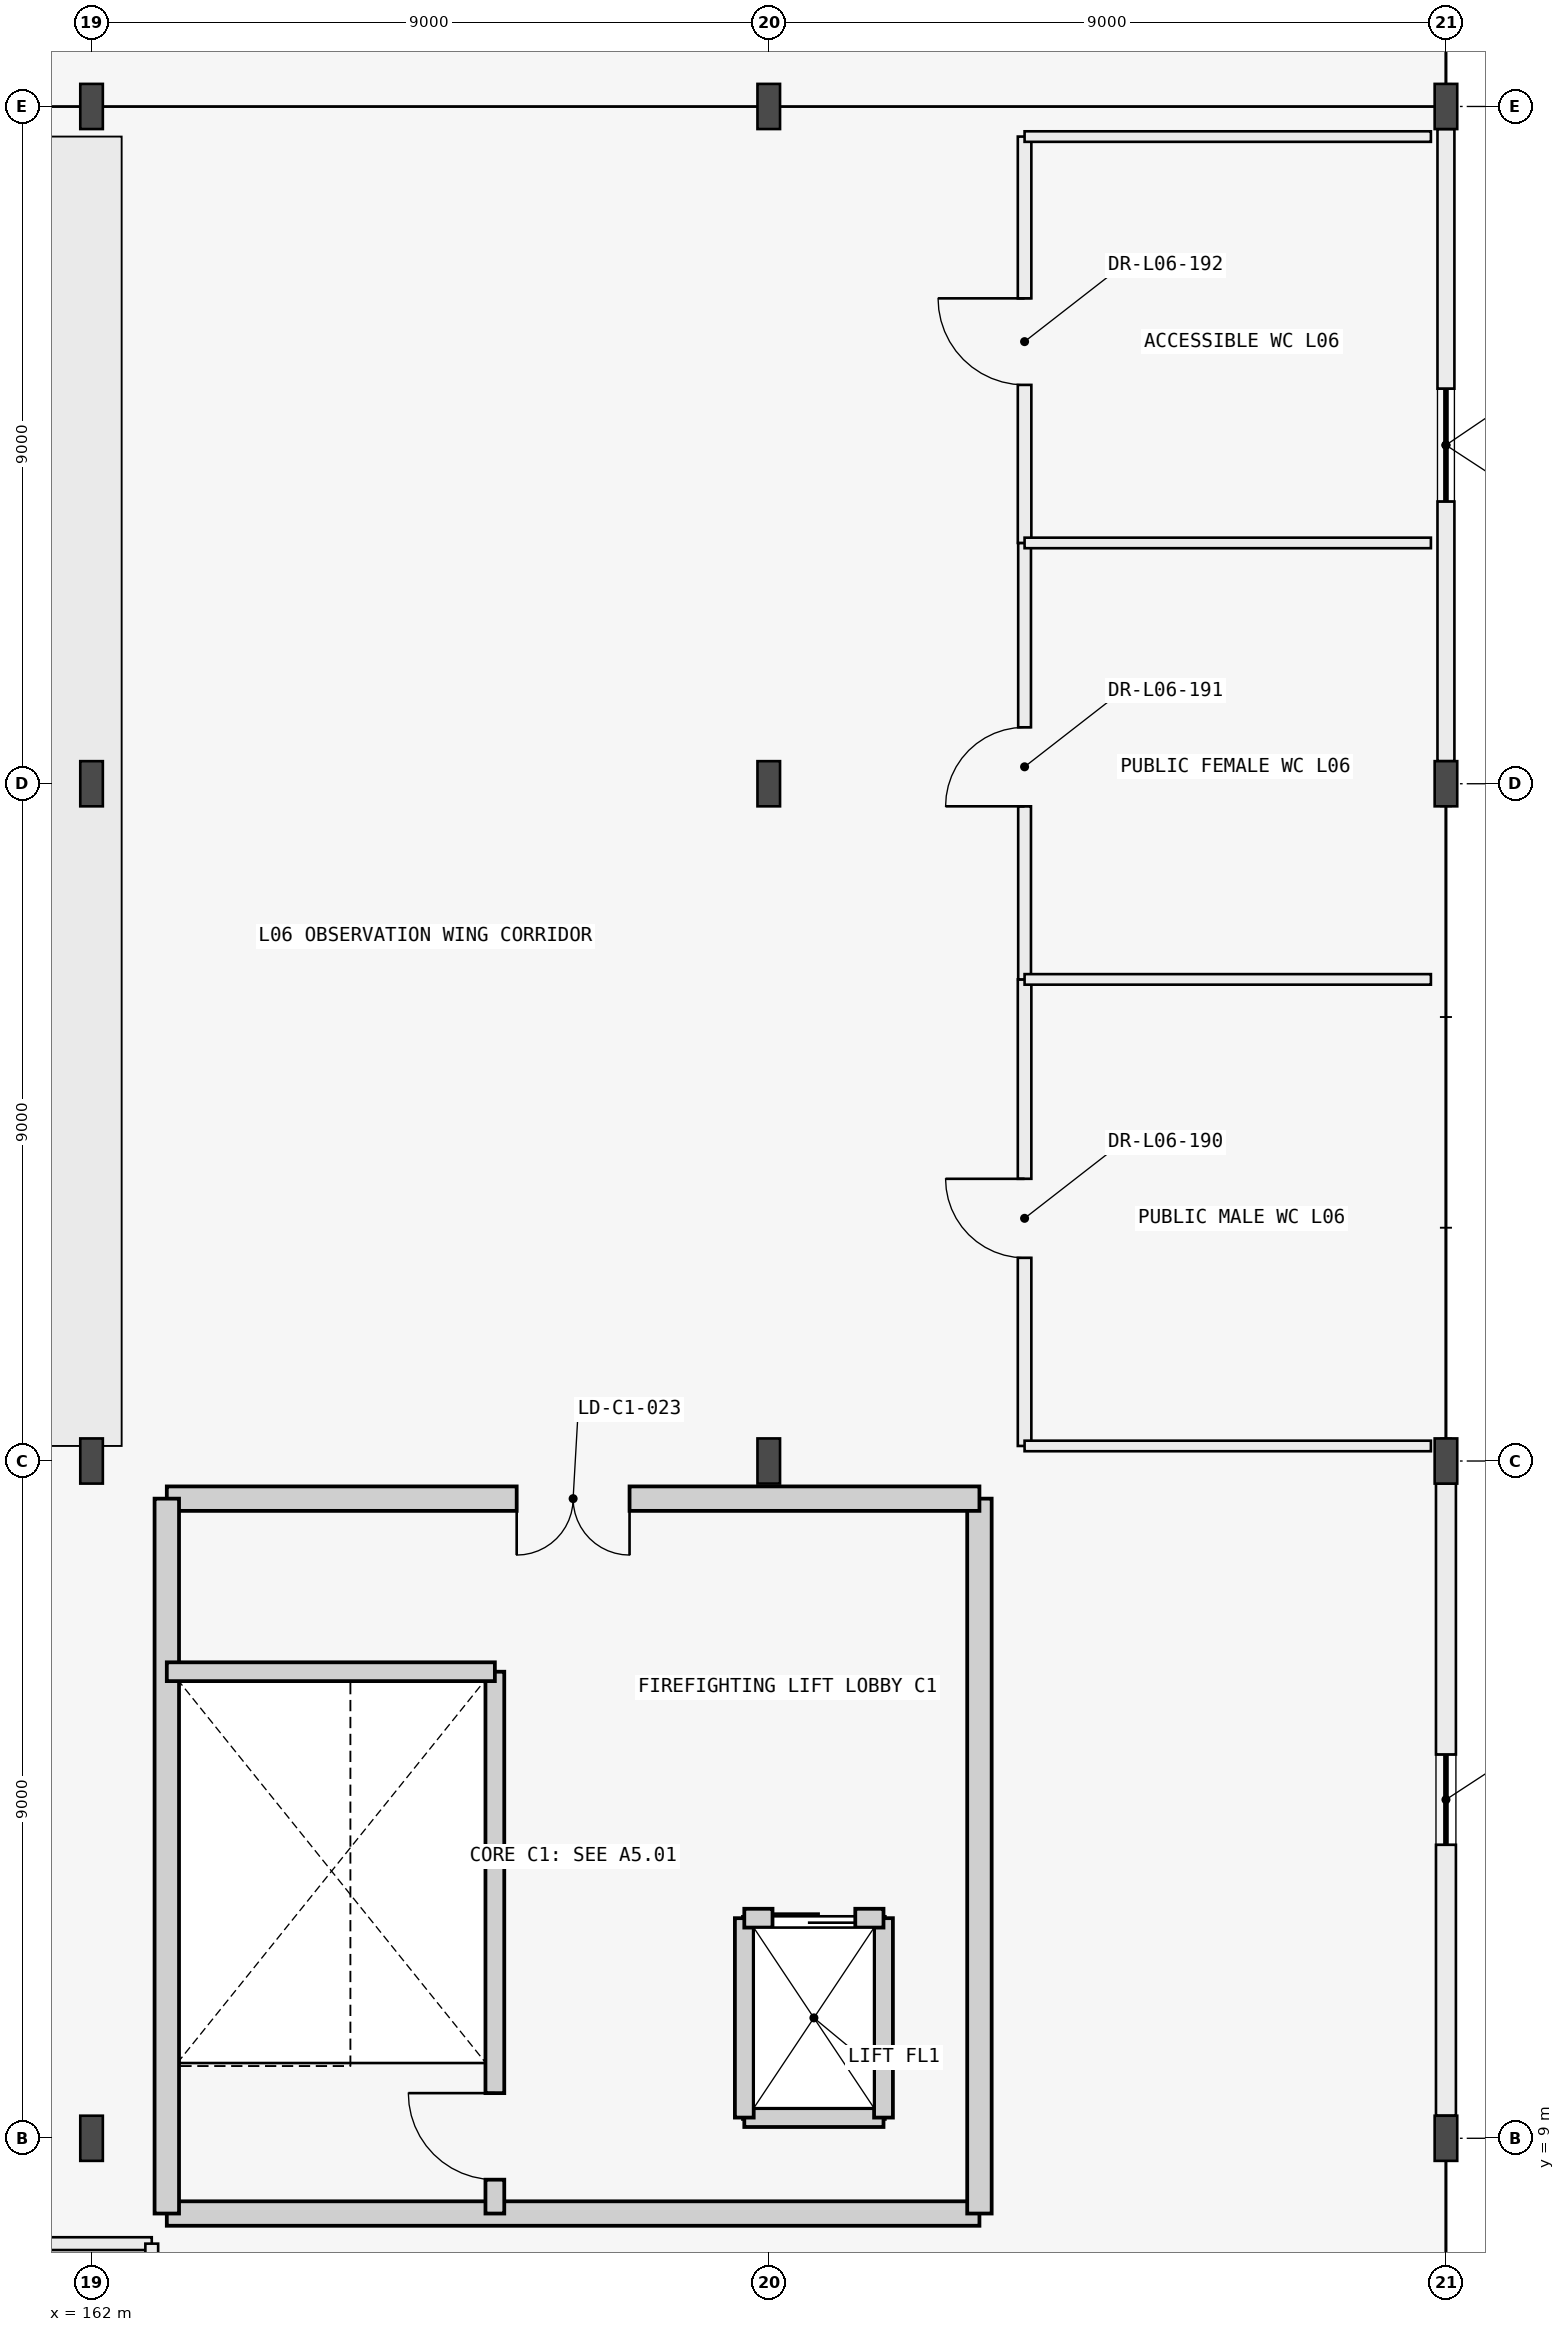
"""IFC4 building model, lengths in metres.
Left out: names, types, materials, properties, quantities, classifications, styles, units other than length and angle.
Written with IfcOpenShell. Run it as: python <this file> out.ifc"""

import sys

from ifc_helpers import new_model, si_unit, direction, frame, frame_2d, origin, origin_2d, place, context, subcontext, project, spatial, rectangle, i_section, extrude, element, fill, save


model = new_model("IFC4")
c1 = context("Model", 3, precision=1e-05, world=origin(), true_north=direction((0.0, 1.0)))
c2 = subcontext(c1, "Body", "Model", "MODEL_VIEW")
j1 = project(units=[si_unit("LENGTHUNIT", "METRE"), si_unit("PLANEANGLEUNIT", "RADIAN")], contexts=[c1])
p1 = place(None, origin())
s1 = spatial("IfcSite", under=j1, at=p1, CompositionType="ELEMENT")
p2 = place(p1, origin())
s2 = spatial("IfcBuilding", under=s1, at=p2, CompositionType="ELEMENT")
p3 = place(p2, frame((0.0, 0.0, 25.2)))
s3 = spatial("IfcBuildingStorey", under=s2, at=p3, CompositionType="ELEMENT", Elevation=25.2)
for number, where, z_axis, x_axis in (
    (1, (162.0, 9.0, 0.0), (0.0, 0.0, 1.0), (1.0, 0.0, 0.0)),
    (2, (180.0, 9.0, 0.0), (0.0, 0.0, 1.0), (1.0, 0.0, 0.0)),
    (3, (162.0, 18.0, 0.0), (0.0, 0.0, 1.0), (1.0, 0.0, 0.0)),
    (4, (171.0, 18.0, 0.0), (0.0, 0.0, 1.0), (1.0, 0.0, 0.0)),
    (5, (180.0, 18.0, 0.0), (0.0, 0.0, 1.0), (1.0, 0.0, 0.0)),
    (6, (162.0, 27.0, 0.0), (0.0, 0.0, 1.0), (1.0, 0.0, 0.0)),
    (7, (171.0, 27.0, 0.0), (0.0, 0.0, 1.0), (1.0, 0.0, 0.0)),
    (8, (180.0, 27.0, 0.0), (0.0, 0.0, 1.0), (1.0, 0.0, 0.0)),
    (9, (162.0, 36.0, 0.0), (0.0, 0.0, 1.0), (1.0, 0.0, 0.0)),
    (10, (171.0, 36.0, 0.0), (0.0, 0.0, 1.0), (1.0, 0.0, 0.0)),
    (11, (180.0, 36.0, 0.0), (0.0, 0.0, 1.0), (1.0, 0.0, 0.0)),
):
    element("IfcColumn", number, at=place(p3, frame(where, z_axis=z_axis, x_axis=x_axis)), inside=s3, PredefinedType="COLUMN", context=c2, shape_type="SweptSolid", body=[
        extrude(i_section(OverallWidth=0.3, OverallDepth=0.6, WebThickness=0.015, FlangeThickness=0.03, FilletRadius=0.027, at=origin_2d()), origin(), (0.0, 0.0, 1.0), 4.2),
    ])
p4 = place(p3, frame((180.0, 9.3, 0.0), z_axis=(0.0, 0.0, 1.0), x_axis=(0.0, 1.0, 0.0)))
e12 = element("IfcWall", 12, at=p4, inside=s3, PredefinedType="STANDARD", context=c2, shape_type="SweptSolid", body=[
    extrude(rectangle(XDim=8.4, YDim=0.265, at=frame_2d((4.2, 0.0))), origin(), (0.0, 0.0, 1.0), 3.635),
])
p5 = place(p4, frame((3.6, 0.0, 0.95)))
e13 = element("IfcOpeningElement", 13, at=p5, cuts=e12, PredefinedType="OPENING", context=c2, shape_type="SweptSolid", body=[
    extrude(rectangle(XDim=1.2, YDim=1.35, at=frame_2d((0.6, 0.675))), frame((0.0, 0.143, 0.0), z_axis=(0.0, -1.0, 0.0), x_axis=(1.0, 0.0, 0.0)), (0.0, 0.0, 1.0), 0.285),
])
p6 = place(p3, frame((180.0, 27.3, 0.0), z_axis=(0.0, 0.0, 1.0), x_axis=(0.0, 1.0, 0.0)))
e14 = element("IfcWall", 14, at=p6, inside=s3, PredefinedType="STANDARD", context=c2, shape_type="SweptSolid", body=[
    extrude(rectangle(XDim=8.4, YDim=0.225, at=frame_2d((4.2, 0.0))), origin(), (0.0, 0.0, 1.0), 3.635),
])
p7 = place(p6, frame((3.45, 0.0, 0.95)))
e15 = element("IfcOpeningElement", 15, at=p7, cuts=e14, PredefinedType="OPENING", context=c2, shape_type="SweptSolid", body=[
    extrude(rectangle(XDim=1.5, YDim=1.5, at=frame_2d((0.75, 0.75))), frame((0.0, 0.123, 0.0), z_axis=(0.0, -1.0, 0.0), x_axis=(1.0, 0.0, 0.0)), (0.0, 0.0, 1.0), 0.245),
])
p8 = place(p3, frame((163.0, 8.0, 0.0), z_axis=(0.0, 0.0, 1.0), x_axis=(1.0, 0.0, 0.0)))
e16 = element("IfcWall", 16, at=p8, inside=s3, PredefinedType="SHEAR", context=c2, shape_type="SweptSolid", body=[
    extrude(rectangle(XDim=10.8, YDim=0.325, at=frame_2d((5.4, 0.0))), origin(), (0.0, 0.0, 1.0), 3.96),
])
p9 = place(p3, frame((173.8, 8.0, 0.0), z_axis=(0.0, 0.0, 1.0), x_axis=(0.0, 1.0, 0.0)))
e17 = element("IfcWall", 17, at=p9, inside=s3, PredefinedType="SHEAR", context=c2, shape_type="SweptSolid", body=[
    extrude(rectangle(XDim=9.5, YDim=0.325, at=frame_2d((4.75, 0.0))), origin(), (0.0, 0.0, 1.0), 3.96),
])
p10 = place(p3, frame((173.8, 17.5, 0.0), z_axis=(0.0, 0.0, 1.0), x_axis=(-1.0, 0.0, 0.0)))
e18 = element("IfcWall", 18, at=p10, inside=s3, PredefinedType="SHEAR", context=c2, shape_type="SweptSolid", body=[
    extrude(rectangle(XDim=10.8, YDim=0.325, at=frame_2d((5.4, 0.0))), origin(), (0.0, 0.0, 1.0), 3.96),
])
p11 = place(p10, frame((4.65, 0.0, 0.0)))
e19 = element("IfcOpeningElement", 19, at=p11, cuts=e18, PredefinedType="OPENING", context=c2, shape_type="SweptSolid", body=[
    extrude(rectangle(XDim=1.5, YDim=2.2, at=frame_2d((0.75, 1.1))), frame((0.0, 0.172, 0.0), z_axis=(0.0, -1.0, 0.0), x_axis=(1.0, 0.0, 0.0)), (0.0, 0.0, 1.0), 0.345),
])
p12 = place(p3, frame((163.0, 17.5, 0.0), z_axis=(0.0, 0.0, 1.0), x_axis=(0.0, -1.0, 0.0)))
e20 = element("IfcWall", 20, at=p12, inside=s3, PredefinedType="SHEAR", context=c2, shape_type="SweptSolid", body=[
    extrude(rectangle(XDim=9.5, YDim=0.325, at=frame_2d((4.75, 0.0))), origin(), (0.0, 0.0, 1.0), 3.96),
])
p13 = place(p3, frame((167.36, 8.0, 0.0), z_axis=(0.0, 0.0, 1.0), x_axis=(0.0, 1.0, 0.0)))
e21 = element("IfcWall", 21, at=p13, inside=s3, PredefinedType="SHEAR", context=c2, shape_type="SweptSolid", body=[
    extrude(rectangle(XDim=7.2, YDim=0.25, at=frame_2d((3.6, 0.0))), origin(), (0.0, 0.0, 1.0), 3.96),
])
p14 = place(p13, frame((0.45, 0.0, 0.0)))
e22 = element("IfcOpeningElement", 22, at=p14, cuts=e21, PredefinedType="OPENING", context=c2, shape_type="SweptSolid", body=[
    extrude(rectangle(XDim=1.15, YDim=2.15, at=frame_2d((0.575, 1.075))), frame((0.0, 0.135, 0.0), z_axis=(0.0, -1.0, 0.0), x_axis=(1.0, 0.0, 0.0)), (0.0, 0.0, 1.0), 0.27),
])
p15 = place(p3, frame((163.0, 15.2, 0.0), z_axis=(0.0, 0.0, 1.0), x_axis=(1.0, 0.0, 0.0)))
e23 = element("IfcWall", 23, at=p15, inside=s3, PredefinedType="SHEAR", context=c2, shape_type="SweptSolid", body=[
    extrude(rectangle(XDim=4.36, YDim=0.25, at=frame_2d((2.18, 0.0))), origin(), (0.0, 0.0, 1.0), 3.96),
])
p16 = place(p3, frame((170.675, 9.275, 0.0), z_axis=(0.0, 0.0, 1.0), x_axis=(1.0, 0.0, 0.0)))
e24 = element("IfcWall", 24, at=p16, inside=s3, PredefinedType="SHEAR", context=c2, shape_type="SweptSolid", body=[
    extrude(rectangle(XDim=1.85, YDim=0.25, at=frame_2d((0.925, 0.0))), origin(), (0.0, 0.0, 1.0), 3.96),
])
for number, where, z_axis, x_axis in (
    (25, (170.675, 9.275, 0.0), (0.0, 0.0, 1.0), (0.0, 1.0, 0.0)),
    (26, (172.525, 9.275, 0.0), (0.0, 0.0, 1.0), (0.0, 1.0, 0.0)),
):
    element("IfcWall", number, at=place(p3, frame(where, z_axis=z_axis, x_axis=x_axis)), inside=s3, PredefinedType="SHEAR", context=c2, shape_type="SweptSolid", body=[
        extrude(rectangle(XDim=2.65, YDim=0.25, at=frame_2d((1.325, 0.0))), origin(), (0.0, 0.0, 1.0), 3.96),
    ])
p17 = place(p3, frame((170.675, 11.925, 0.0), z_axis=(0.0, 0.0, 1.0), x_axis=(1.0, 0.0, 0.0)))
e27 = element("IfcWall", 27, at=p17, inside=s3, PredefinedType="SHEAR", context=c2, shape_type="SweptSolid", body=[
    extrude(rectangle(XDim=1.85, YDim=0.25, at=frame_2d((0.925, 0.0))), origin(), (0.0, 0.0, 1.0), 3.96),
])
p18 = place(p17, frame((0.375, 0.0, 0.0)))
e28 = element("IfcOpeningElement", 28, at=p18, cuts=e27, PredefinedType="OPENING", context=c2, shape_type="SweptSolid", body=[
    extrude(rectangle(XDim=1.1, YDim=2.15, at=frame_2d((0.55, 1.075))), frame((0.0, 0.135, 0.0), z_axis=(0.0, -1.0, 0.0), x_axis=(1.0, 0.0, 0.0)), (0.0, 0.0, 1.0), 0.27),
])
p19 = place(p3, frame((153.2, 7.6, 0.0), z_axis=(0.0, 0.0, 1.0), x_axis=(1.0, 0.0, 0.0)))
e29 = element("IfcWall", 29, at=p19, inside=s3, PredefinedType="PARTITIONING", context=c2, shape_type="SweptSolid", body=[
    extrude(rectangle(XDim=9.6, YDim=0.17, at=frame_2d((4.8, 0.0))), origin(), (0.0, 0.0, 1.0), 3.96),
])
p20 = place(p19, frame((3.8, 0.0, 0.0)))
e30 = element("IfcOpeningElement", 30, at=p20, cuts=e29, PredefinedType="OPENING", context=c2, shape_type="SweptSolid", body=[
    extrude(rectangle(XDim=1.15, YDim=2.15, at=frame_2d((0.575, 1.075))), frame((0.0, 0.095, 0.0), z_axis=(0.0, -1.0, 0.0), x_axis=(1.0, 0.0, 0.0)), (0.0, 0.0, 1.0), 0.19),
])
p21 = place(p3, frame((162.8, 0.2, 0.0), z_axis=(0.0, 0.0, 1.0), x_axis=(0.0, 1.0, 0.0)))
e31 = element("IfcWall", 31, at=p21, inside=s3, PredefinedType="PARTITIONING", context=c2, shape_type="SweptSolid", body=[
    extrude(rectangle(XDim=7.4, YDim=0.17, at=frame_2d((3.7, 0.0))), origin(), (0.0, 0.0, 1.0), 3.96),
])
p22 = place(p3, frame((174.4, 18.2, 0.0), z_axis=(0.0, 0.0, 1.0), x_axis=(0.0, 1.0, 0.0)))
e32 = element("IfcWall", 32, at=p22, inside=s3, PredefinedType="PARTITIONING", context=c2, shape_type="SweptSolid", body=[
    extrude(rectangle(XDim=6.2, YDim=0.18, at=frame_2d((3.1, 0.0))), origin(), (0.0, 0.0, 1.0), 3.635),
])
p23 = place(p22, frame((2.5, 0.0, 0.0)))
e33 = element("IfcOpeningElement", 33, at=p23, cuts=e32, PredefinedType="OPENING", context=c2, shape_type="SweptSolid", body=[
    extrude(rectangle(XDim=1.05, YDim=2.1, at=frame_2d((0.525, 1.05))), frame((0.0, 0.1, 0.0), z_axis=(0.0, -1.0, 0.0), x_axis=(1.0, 0.0, 0.0)), (0.0, 0.0, 1.0), 0.2),
])
p24 = place(p3, frame((174.4, 24.4, 0.0), z_axis=(0.0, 0.0, 1.0), x_axis=(0.0, 1.0, 0.0)))
e34 = element("IfcWall", 34, at=p24, inside=s3, PredefinedType="PARTITIONING", context=c2, shape_type="SweptSolid", body=[
    extrude(rectangle(XDim=5.8, YDim=0.17, at=frame_2d((2.9, 0.0))), origin(), (0.0, 0.0, 1.0), 3.635),
])
p25 = place(p24, frame((2.3, 0.0, 0.0)))
e35 = element("IfcOpeningElement", 35, at=p25, cuts=e34, PredefinedType="OPENING", context=c2, shape_type="SweptSolid", body=[
    extrude(rectangle(XDim=1.05, YDim=2.1, at=frame_2d((0.525, 1.05))), frame((0.0, 0.095, 0.0), z_axis=(0.0, -1.0, 0.0), x_axis=(1.0, 0.0, 0.0)), (0.0, 0.0, 1.0), 0.19),
])
p26 = place(p3, frame((174.4, 30.2, 0.0), z_axis=(0.0, 0.0, 1.0), x_axis=(0.0, 1.0, 0.0)))
e36 = element("IfcWall", 36, at=p26, inside=s3, PredefinedType="PARTITIONING", context=c2, shape_type="SweptSolid", body=[
    extrude(rectangle(XDim=5.4, YDim=0.18, at=frame_2d((2.7, 0.0))), origin(), (0.0, 0.0, 1.0), 3.635),
])
p27 = place(p26, frame((2.1, 0.0, 0.0)))
e37 = element("IfcOpeningElement", 37, at=p27, cuts=e36, PredefinedType="OPENING", context=c2, shape_type="SweptSolid", body=[
    extrude(rectangle(XDim=1.15, YDim=2.15, at=frame_2d((0.575, 1.075))), frame((0.0, 0.1, 0.0), z_axis=(0.0, -1.0, 0.0), x_axis=(1.0, 0.0, 0.0)), (0.0, 0.0, 1.0), 0.2),
])
p28 = place(p3, frame((174.4, 18.2, 0.0), z_axis=(0.0, 0.0, 1.0), x_axis=(1.0, 0.0, 0.0)))
e38 = element("IfcWall", 38, at=p28, inside=s3, PredefinedType="PARTITIONING", context=c2, shape_type="SweptSolid", body=[
    extrude(rectangle(XDim=5.4, YDim=0.14, at=frame_2d((2.7, 0.0))), origin(), (0.0, 0.0, 1.0), 3.435),
])
for number, where, z_axis, x_axis in (
    (39, (174.4, 24.4, 0.0), (0.0, 0.0, 1.0), (1.0, 0.0, 0.0)),
    (40, (174.4, 30.2, 0.0), (0.0, 0.0, 1.0), (1.0, 0.0, 0.0)),
):
    element("IfcWall", number, at=place(p3, frame(where, z_axis=z_axis, x_axis=x_axis)), inside=s3, PredefinedType="PARTITIONING", context=c2, shape_type="SweptSolid", body=[
        extrude(rectangle(XDim=5.4, YDim=0.14, at=frame_2d((2.7, 0.0))), origin(), (0.0, 0.0, 1.0), 3.96),
    ])
p29 = place(p3, frame((174.4, 35.6, 0.0), z_axis=(0.0, 0.0, 1.0), x_axis=(1.0, 0.0, 0.0)))
e41 = element("IfcWall", 41, at=p29, inside=s3, PredefinedType="PARTITIONING", context=c2, shape_type="SweptSolid", body=[
    extrude(rectangle(XDim=5.4, YDim=0.14, at=frame_2d((2.7, 0.0))), origin(), (0.0, 0.0, 1.0), 3.435),
])
p30 = place(p5, origin())
e42 = element("IfcWindow", 42, at=p30, inside=s3, PartitioningType="SINGLE_PANEL", PredefinedType="WINDOW", context=c2, shape_type="SweptSolid", body=[
    extrude(rectangle(XDim=1.2, YDim=1.35, at=frame_2d((0.6, 0.675))), frame((0.0, 0.03, 0.0), z_axis=(0.0, -1.0, 0.0), x_axis=(1.0, 0.0, 0.0)), (0.0, 0.0, 1.0), 0.06),
])
fill(e13, e42)
p31 = place(p7, origin())
e43 = element("IfcWindow", 43, at=p31, inside=s3, PartitioningType="SINGLE_PANEL", PredefinedType="WINDOW", context=c2, shape_type="SweptSolid", body=[
    extrude(rectangle(XDim=1.5, YDim=1.5, at=frame_2d((0.75, 0.75))), frame((0.0, 0.03, 0.0), z_axis=(0.0, -1.0, 0.0), x_axis=(1.0, 0.0, 0.0)), (0.0, 0.0, 1.0), 0.06),
])
fill(e15, e43)
p32 = place(p14, origin())
e44 = element("IfcDoor", 44, at=p32, inside=s3, OperationType="SINGLE_SWING_RIGHT", PredefinedType="DOOR", context=c2, shape_type="SweptSolid", body=[
    extrude(rectangle(XDim=1.15, YDim=2.15, at=frame_2d((0.575, 1.075))), frame((0.0, 0.025, 0.0), z_axis=(0.0, -1.0, 0.0), x_axis=(1.0, 0.0, 0.0)), (0.0, 0.0, 1.0), 0.05),
])
fill(e22, e44)
p33 = place(p11, origin())
e45 = element("IfcDoor", 45, at=p33, inside=s3, OperationType="DOUBLE_DOOR_SINGLE_SWING", PredefinedType="DOOR", context=c2, shape_type="SweptSolid", body=[
    extrude(rectangle(XDim=1.5, YDim=2.2, at=frame_2d((0.75, 1.1))), frame((0.0, 0.025, 0.0), z_axis=(0.0, -1.0, 0.0), x_axis=(1.0, 0.0, 0.0)), (0.0, 0.0, 1.0), 0.05),
])
fill(e19, e45)
p34 = place(p18, origin())
e46 = element("IfcDoor", 46, at=p34, inside=s3, OperationType="DOUBLE_DOOR_SLIDING", PredefinedType="USERDEFINED", context=c2, shape_type="SweptSolid", body=[
    extrude(rectangle(XDim=1.1, YDim=2.15, at=frame_2d((0.55, 1.075))), frame((0.0, 0.025, 0.0), z_axis=(0.0, -1.0, 0.0), x_axis=(1.0, 0.0, 0.0)), (0.0, 0.0, 1.0), 0.05),
])
fill(e28, e46)
p35 = place(p23, origin())
e47 = element("IfcDoor", 47, at=p35, inside=s3, OperationType="SINGLE_SWING_RIGHT", PredefinedType="DOOR", context=c2, shape_type="SweptSolid", body=[
    extrude(rectangle(XDim=1.05, YDim=2.1, at=frame_2d((0.525, 1.05))), frame((0.0, 0.025, 0.0), z_axis=(0.0, -1.0, 0.0), x_axis=(1.0, 0.0, 0.0)), (0.0, 0.0, 1.0), 0.05),
])
fill(e33, e47)
p36 = place(p25, origin())
e48 = element("IfcDoor", 48, at=p36, inside=s3, OperationType="SINGLE_SWING_LEFT", PredefinedType="DOOR", context=c2, shape_type="SweptSolid", body=[
    extrude(rectangle(XDim=1.05, YDim=2.1, at=frame_2d((0.525, 1.05))), frame((0.0, 0.025, 0.0), z_axis=(0.0, -1.0, 0.0), x_axis=(1.0, 0.0, 0.0)), (0.0, 0.0, 1.0), 0.05),
])
fill(e35, e48)
p37 = place(p27, origin())
e49 = element("IfcDoor", 49, at=p37, inside=s3, OperationType="SINGLE_SWING_RIGHT", PredefinedType="DOOR", context=c2, shape_type="SweptSolid", body=[
    extrude(rectangle(XDim=1.15, YDim=2.15, at=frame_2d((0.575, 1.075))), frame((0.0, 0.025, 0.0), z_axis=(0.0, -1.0, 0.0), x_axis=(1.0, 0.0, 0.0)), (0.0, 0.0, 1.0), 0.05),
])
fill(e37, e49)
save(model, sys.argv[1])
